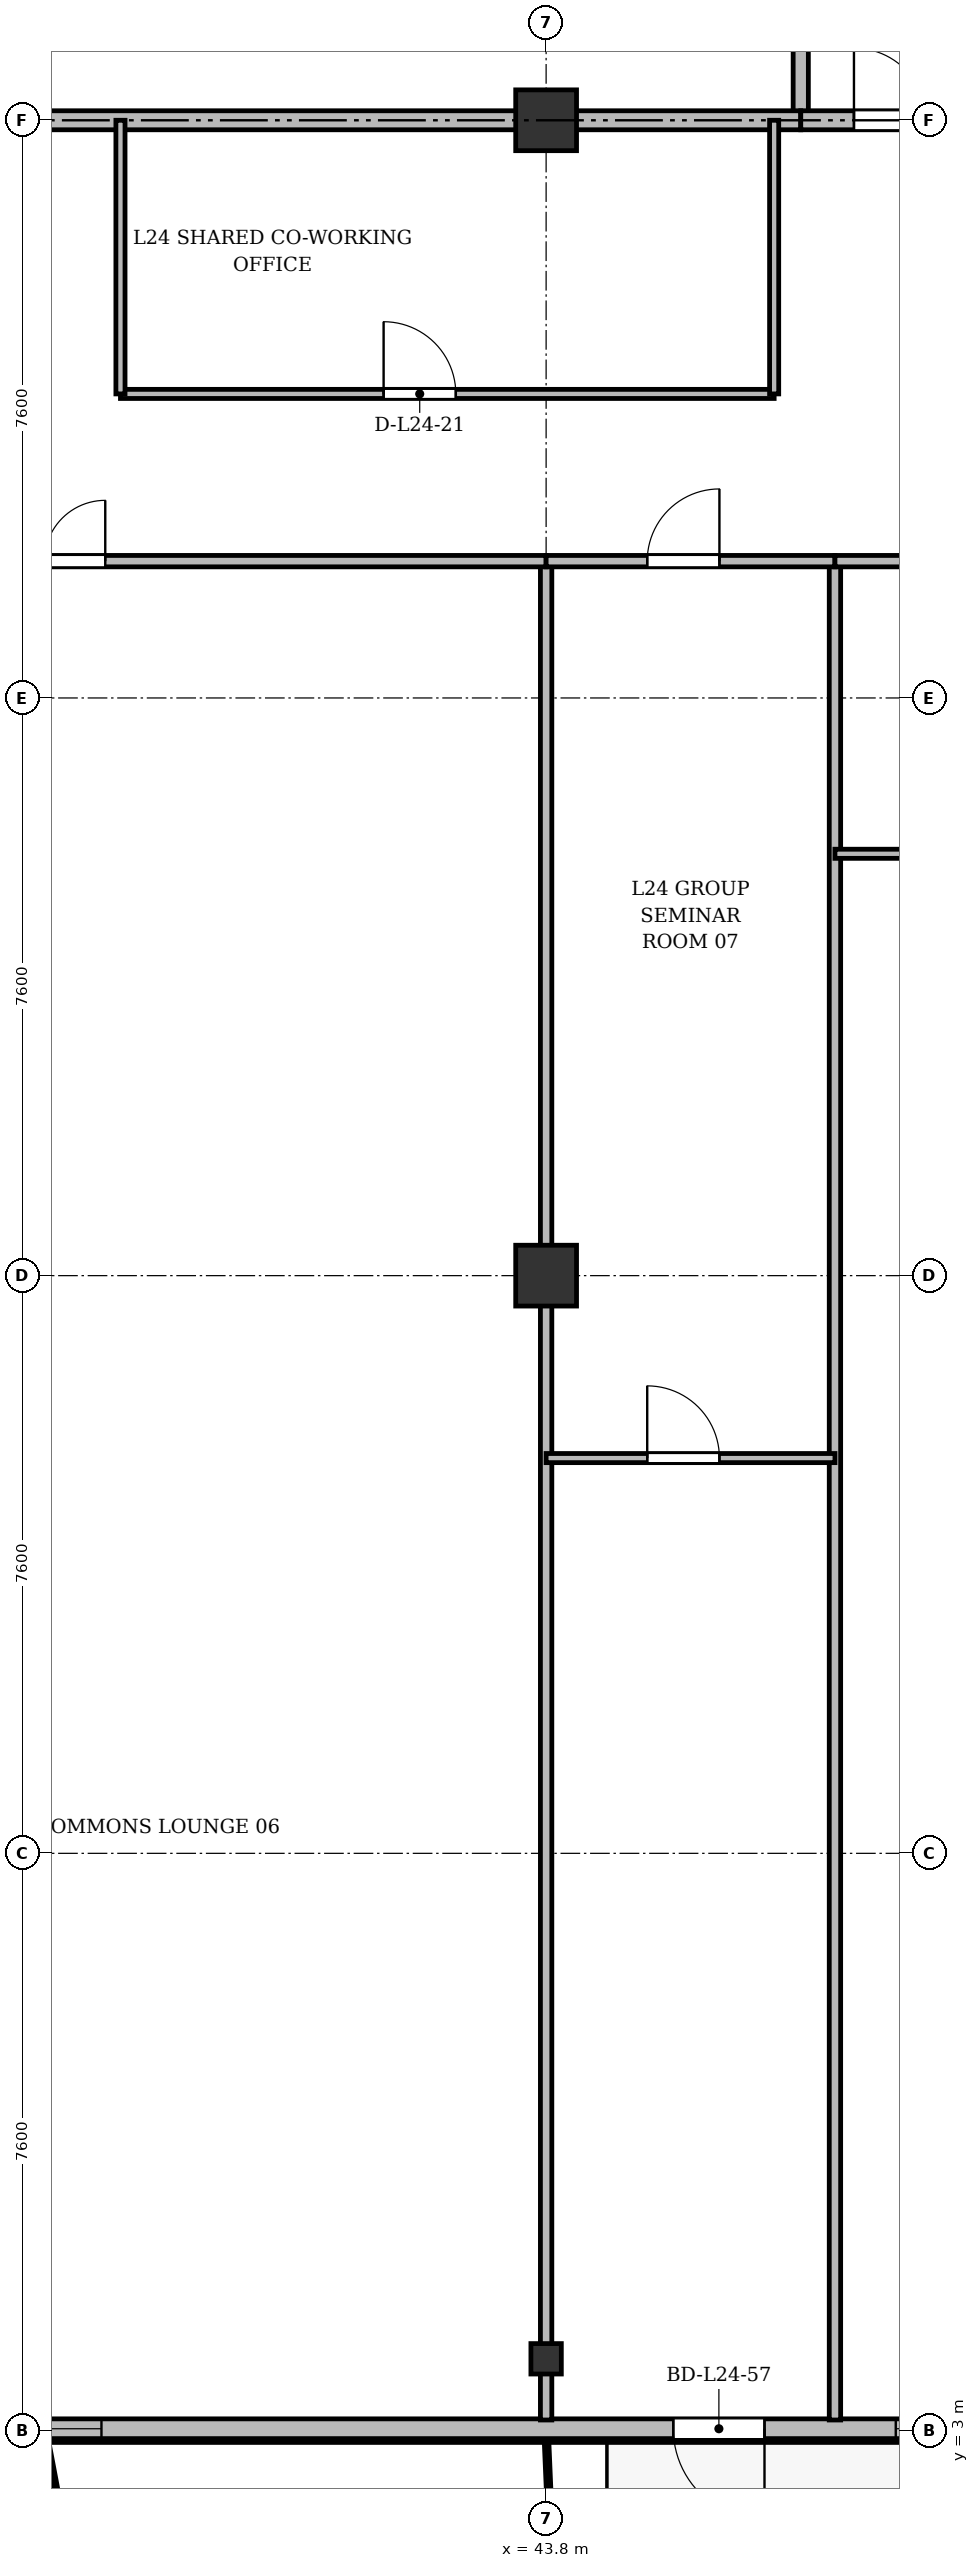
"""IFC4 building model, lengths in metres.
Left out: names, types, materials, properties, quantities, classifications, styles, units other than length and angle.
Written with IfcOpenShell. Run it as: python <this file> out.ifc"""

import sys

from ifc_helpers import new_model, si_unit, direction, frame, frame_2d, origin, origin_2d, place, context, subcontext, project, spatial, rectangle, i_section, extrude, source, transform, mapped, element, fill, save


model = new_model("IFC4")
c1 = context("Model", 3, precision=1e-05, world=origin(), true_north=direction((0.0, 1.0)))
c2 = subcontext(c1, "Body", "Model", "MODEL_VIEW")
j1 = project(units=[si_unit("LENGTHUNIT", "METRE"), si_unit("PLANEANGLEUNIT", "RADIAN")], contexts=[c1])
p1 = place(None, origin())
s1 = spatial("IfcSite", under=j1, at=p1, CompositionType="ELEMENT")
p2 = place(p1, origin())
s2 = spatial("IfcBuilding", under=s1, at=p2, CompositionType="ELEMENT")
p3 = place(p2, frame((0.0, 0.0, 96.1)))
s3 = spatial("IfcBuildingStorey", under=s2, at=p3, CompositionType="ELEMENT", Elevation=96.1)
m1 = source(origin(), c2, "Body", "SweptSolid", [
    extrude(i_section(OverallWidth=0.4, OverallDepth=0.4, WebThickness=0.022, FlangeThickness=0.035, at=origin_2d()), origin(), (0.0, 0.0, 1.0), 3.6),
])
p4 = place(p3, frame((43.8, 3.95, 0.0), z_axis=(0.0, 0.0, 1.0), x_axis=(1.0, 0.0, 0.0)))
e1 = element("IfcColumn", 1, at=p4, inside=s3, PredefinedType="COLUMN", context=c2, shape_type="MappedRepresentation", body=[
    mapped(m1, transform((0.0, 0.0, 0.0), x_axis=(1.0, 0.0, 0.0), y_axis=(0.0, 1.0, 0.0), z_axis=(0.0, 0.0, 1.0), scale=1.0)),
])
m2 = source(origin(), c2, "Body", "SweptSolid", [
    extrude(rectangle(XDim=0.8, YDim=0.8, at=origin_2d()), origin(), (0.0, 0.0, 1.0), 3.6),
])
for number, where, z_axis, x_axis in (
    (2, (43.8, 18.2, 0.0), (0.0, 0.0, 1.0), (1.0, 0.0, 0.0)),
    (3, (43.8, 33.4, 0.0), (0.0, 0.0, 1.0), (1.0, 0.0, 0.0)),
):
    element("IfcColumn", number, at=place(p3, frame(where, z_axis=z_axis, x_axis=x_axis)), inside=s3, PredefinedType="COLUMN", context=c2, shape_type="MappedRepresentation", body=[
        mapped(m2, transform((0.0, 0.0, 0.0), x_axis=(1.0, 0.0, 0.0), y_axis=(0.0, 1.0, 0.0), z_axis=(0.0, 0.0, 1.0), scale=1.0)),
    ])
p5 = place(p3, frame((66.9, 3.03, 0.0), z_axis=(0.0, 0.0, 1.0), x_axis=(-1.0, 0.0, 0.0)))
e4 = element("IfcWall", 4, at=p5, inside=s3, PredefinedType="SOLIDWALL", context=c2, shape_type="SweptSolid", body=[
    extrude(rectangle(XDim=59.4, YDim=0.26, at=frame_2d((29.7, 0.0))), origin(), (0.0, 0.0, 1.0), 3.34),
])
p6 = place(p5, frame((2.1, 0.0, 0.9)))
e5 = element("IfcOpeningElement", 5, at=p6, cuts=e4, PredefinedType="OPENING", context=c2, shape_type="SweptSolid", body=[
    extrude(rectangle(XDim=1.8, YDim=1.8, at=frame_2d((0.9, 0.9))), frame((0.0, 0.14, 0.0), z_axis=(0.0, -1.0, 0.0), x_axis=(1.0, 0.0, 0.0)), (0.0, 0.0, 1.0), 0.28),
])
p7 = place(p5, frame((5.3, 0.0, 0.9)))
e6 = element("IfcOpeningElement", 6, at=p7, cuts=e4, PredefinedType="OPENING", context=c2, shape_type="SweptSolid", body=[
    extrude(rectangle(XDim=2.2, YDim=1.8, at=frame_2d((1.1, 0.9))), frame((0.0, 0.14, 0.0), z_axis=(0.0, -1.0, 0.0), x_axis=(1.0, 0.0, 0.0)), (0.0, 0.0, 1.0), 0.28),
])
p8 = place(p5, frame((8.65, 0.0, 0.9)))
e7 = element("IfcOpeningElement", 7, at=p8, cuts=e4, PredefinedType="OPENING", context=c2, shape_type="SweptSolid", body=[
    extrude(rectangle(XDim=1.5, YDim=1.75, at=frame_2d((0.75, 0.875))), frame((0.0, 0.14, 0.0), z_axis=(0.0, -1.0, 0.0), x_axis=(1.0, 0.0, 0.0)), (0.0, 0.0, 1.0), 0.28),
])
p9 = place(p5, frame((11.0, 0.0, 0.9)))
e8 = element("IfcOpeningElement", 8, at=p9, cuts=e4, PredefinedType="OPENING", context=c2, shape_type="SweptSolid", body=[
    extrude(rectangle(XDim=2.0, YDim=1.95, at=frame_2d((1.0, 0.975))), frame((0.0, 0.14, 0.0), z_axis=(0.0, -1.0, 0.0), x_axis=(1.0, 0.0, 0.0)), (0.0, 0.0, 1.0), 0.28),
])
p10 = place(p5, frame((13.775, 0.0, 0.9)))
e9 = element("IfcOpeningElement", 9, at=p10, cuts=e4, PredefinedType="OPENING", context=c2, shape_type="SweptSolid", body=[
    extrude(rectangle(XDim=1.65, YDim=1.85, at=frame_2d((0.825, 0.925))), frame((0.0, 0.14, 0.0), z_axis=(0.0, -1.0, 0.0), x_axis=(1.0, 0.0, 0.0)), (0.0, 0.0, 1.0), 0.28),
])
p11 = place(p5, frame((16.7, 0.0, 0.9)))
e10 = element("IfcOpeningElement", 10, at=p11, cuts=e4, PredefinedType="OPENING", context=c2, shape_type="SweptSolid", body=[
    extrude(rectangle(XDim=1.8, YDim=1.8, at=frame_2d((0.9, 0.9))), frame((0.0, 0.14, 0.0), z_axis=(0.0, -1.0, 0.0), x_axis=(1.0, 0.0, 0.0)), (0.0, 0.0, 1.0), 0.28),
])
p12 = place(p5, frame((20.227, 0.0, 0.0)))
e11 = element("IfcOpeningElement", 11, at=p12, cuts=e4, PredefinedType="OPENING", context=c2, shape_type="SweptSolid", body=[
    extrude(rectangle(XDim=1.2, YDim=2.2, at=frame_2d((0.6, 1.1))), frame((0.0, 0.14, 0.0), z_axis=(0.0, -1.0, 0.0), x_axis=(1.0, 0.0, 0.0)), (0.0, 0.0, 1.0), 0.28),
])
p13 = place(p5, frame((28.95, 0.0, 0.9)))
e12 = element("IfcOpeningElement", 12, at=p13, cuts=e4, PredefinedType="OPENING", context=c2, shape_type="SweptSolid", body=[
    extrude(rectangle(XDim=1.5, YDim=1.75, at=frame_2d((0.75, 0.875))), frame((0.0, 0.14, 0.0), z_axis=(0.0, -1.0, 0.0), x_axis=(1.0, 0.0, 0.0)), (0.0, 0.0, 1.0), 0.28),
])
p14 = place(p5, frame((36.5, 0.0, 0.9)))
e13 = element("IfcOpeningElement", 13, at=p14, cuts=e4, PredefinedType="OPENING", context=c2, shape_type="SweptSolid", body=[
    extrude(rectangle(XDim=2.0, YDim=1.95, at=frame_2d((1.0, 0.975))), frame((0.0, 0.14, 0.0), z_axis=(0.0, -1.0, 0.0), x_axis=(1.0, 0.0, 0.0)), (0.0, 0.0, 1.0), 0.28),
])
p15 = place(p5, frame((39.075, 0.0, 0.9)))
e14 = element("IfcOpeningElement", 14, at=p15, cuts=e4, PredefinedType="OPENING", context=c2, shape_type="SweptSolid", body=[
    extrude(rectangle(XDim=1.65, YDim=1.85, at=frame_2d((0.825, 0.925))), frame((0.0, 0.14, 0.0), z_axis=(0.0, -1.0, 0.0), x_axis=(1.0, 0.0, 0.0)), (0.0, 0.0, 1.0), 0.28),
])
p16 = place(p5, frame((41.4, 0.0, 0.9)))
e15 = element("IfcOpeningElement", 15, at=p16, cuts=e4, PredefinedType="OPENING", context=c2, shape_type="SweptSolid", body=[
    extrude(rectangle(XDim=1.8, YDim=1.8, at=frame_2d((0.9, 0.9))), frame((0.0, 0.14, 0.0), z_axis=(0.0, -1.0, 0.0), x_axis=(1.0, 0.0, 0.0)), (0.0, 0.0, 1.0), 0.28),
])
p17 = place(p5, frame((45.36, 0.0, 0.0)))
e16 = element("IfcOpeningElement", 16, at=p17, cuts=e4, PredefinedType="OPENING", context=c2, shape_type="SweptSolid", body=[
    extrude(rectangle(XDim=1.2, YDim=2.2, at=frame_2d((0.6, 1.1))), frame((0.0, 0.14, 0.0), z_axis=(0.0, -1.0, 0.0), x_axis=(1.0, 0.0, 0.0)), (0.0, 0.0, 1.0), 0.28),
])
p18 = place(p5, frame((48.55, 0.0, 0.9)))
e17 = element("IfcOpeningElement", 17, at=p18, cuts=e4, PredefinedType="OPENING", context=c2, shape_type="SweptSolid", body=[
    extrude(rectangle(XDim=1.5, YDim=1.75, at=frame_2d((0.75, 0.875))), frame((0.0, 0.14, 0.0), z_axis=(0.0, -1.0, 0.0), x_axis=(1.0, 0.0, 0.0)), (0.0, 0.0, 1.0), 0.28),
])
p19 = place(p5, frame((52.0, 0.0, 0.9)))
e18 = element("IfcOpeningElement", 18, at=p19, cuts=e4, PredefinedType="OPENING", context=c2, shape_type="SweptSolid", body=[
    extrude(rectangle(XDim=2.0, YDim=1.95, at=frame_2d((1.0, 0.975))), frame((0.0, 0.14, 0.0), z_axis=(0.0, -1.0, 0.0), x_axis=(1.0, 0.0, 0.0)), (0.0, 0.0, 1.0), 0.28),
])
p20 = place(p5, frame((55.575, 0.0, 0.9)))
e19 = element("IfcOpeningElement", 19, at=p20, cuts=e4, PredefinedType="OPENING", context=c2, shape_type="SweptSolid", body=[
    extrude(rectangle(XDim=1.65, YDim=1.85, at=frame_2d((0.825, 0.925))), frame((0.0, 0.14, 0.0), z_axis=(0.0, -1.0, 0.0), x_axis=(1.0, 0.0, 0.0)), (0.0, 0.0, 1.0), 0.28),
])
p21 = place(p3, frame((47.15, 33.4, 0.0), z_axis=(0.0, 0.0, 1.0), x_axis=(0.0, 1.0, 0.0)))
e20 = element("IfcWall", 20, at=p21, inside=s3, PredefinedType="SOLIDWALL", context=c2, shape_type="SweptSolid", body=[
    extrude(rectangle(XDim=11.3, YDim=0.2, at=frame_2d((5.65, 0.0))), origin(), (0.0, 0.0, 1.0), 2.752),
])
p22 = place(p3, frame((26.3, 33.4, 0.0), z_axis=(0.0, 0.0, 1.0), x_axis=(1.0, 0.0, 0.0)))
e21 = element("IfcWall", 21, at=p22, inside=s3, PredefinedType="PARTITIONING", context=c2, shape_type="SweptSolid", body=[
    extrude(rectangle(XDim=20.85, YDim=0.25, at=frame_2d((10.425, 0.0))), origin(), (0.0, 0.0, 1.0), 2.752),
])
p23 = place(p22, frame((9.2, 0.0, 0.0)))
e22 = element("IfcOpeningElement", 22, at=p23, cuts=e21, PredefinedType="OPENING", context=c2, shape_type="SweptSolid", body=[
    extrude(rectangle(XDim=1.6, YDim=2.2, at=frame_2d((0.8, 1.1))), frame((0.0, 0.135, 0.0), z_axis=(0.0, -1.0, 0.0), x_axis=(1.0, 0.0, 0.0)), (0.0, 0.0, 1.0), 0.27),
])
p24 = place(p3, frame((47.15, 33.4, 0.0), z_axis=(0.0, 0.0, 1.0), x_axis=(1.0, 0.0, 0.0)))
e23 = element("IfcWall", 23, at=p24, inside=s3, PredefinedType="PARTITIONING", context=c2, shape_type="SweptSolid", body=[
    extrude(rectangle(XDim=11.15, YDim=0.25, at=frame_2d((5.575, 0.0))), origin(), (0.0, 0.0, 1.0), 2.752),
])
p25 = place(p24, frame((0.7, 0.0, 0.0)))
e24 = element("IfcOpeningElement", 24, at=p25, cuts=e23, PredefinedType="OPENING", context=c2, shape_type="SweptSolid", body=[
    extrude(rectangle(XDim=0.95, YDim=2.15, at=frame_2d((0.475, 1.075))), frame((0.0, 0.135, 0.0), z_axis=(0.0, -1.0, 0.0), x_axis=(1.0, 0.0, 0.0)), (0.0, 0.0, 1.0), 0.27),
])
p26 = place(p24, frame((6.0, 0.0, 0.0)))
e25 = element("IfcOpeningElement", 25, at=p26, cuts=e23, PredefinedType="OPENING", context=c2, shape_type="SweptSolid", body=[
    extrude(rectangle(XDim=1.2, YDim=2.15, at=frame_2d((0.6, 1.075))), frame((0.0, 0.135, 0.0), z_axis=(0.0, -1.0, 0.0), x_axis=(1.0, 0.0, 0.0)), (0.0, 0.0, 1.0), 0.27),
])
p27 = place(p3, frame((38.2, 29.8, 0.0), z_axis=(0.0, 0.0, 1.0), x_axis=(1.0, 0.0, 0.0)))
e26 = element("IfcWall", 26, at=p27, inside=s3, PredefinedType="PARTITIONING", context=c2, shape_type="SweptSolid", body=[
    extrude(rectangle(XDim=8.6, YDim=0.12, at=frame_2d((4.3, 0.0))), origin(), (0.0, 0.0, 1.0), 2.84),
])
p28 = place(p27, frame((3.462, 0.0, 0.0)))
e27 = element("IfcOpeningElement", 27, at=p28, cuts=e26, PredefinedType="OPENING", context=c2, shape_type="SweptSolid", body=[
    extrude(rectangle(XDim=0.95, YDim=2.15, at=frame_2d((0.475, 1.075))), frame((0.0, 0.07, 0.0), z_axis=(0.0, -1.0, 0.0), x_axis=(1.0, 0.0, 0.0)), (0.0, 0.0, 1.0), 0.14),
])
for number, where, z_axis, x_axis in (
    (28, (38.2, 29.8, 0.0), (0.0, 0.0, 1.0), (0.0, 1.0, 0.0)),
    (29, (46.8, 29.8, 0.0), (0.0, 0.0, 1.0), (0.0, 1.0, 0.0)),
):
    element("IfcWall", number, at=place(p3, frame(where, z_axis=z_axis, x_axis=x_axis)), inside=s3, PredefinedType="PARTITIONING", context=c2, shape_type="SweptSolid", body=[
        extrude(rectangle(XDim=3.6, YDim=0.12, at=frame_2d((1.8, 0.0))), origin(), (0.0, 0.0, 1.0), 2.752),
    ])
p29 = place(p3, frame((43.8, 3.145, 0.0), z_axis=(0.0, 0.0, 1.0), x_axis=(0.0, 1.0, 0.0)))
e30 = element("IfcWall", 30, at=p29, inside=s3, PredefinedType="PARTITIONING", context=c2, shape_type="SweptSolid", body=[
    extrude(rectangle(XDim=24.455, YDim=0.15, at=frame_2d((12.228, 0.0))), origin(), (0.0, 0.0, 1.0), 2.84),
])
p30 = place(p3, frame((47.6, 3.145, 0.0), z_axis=(0.0, 0.0, 1.0), x_axis=(0.0, 1.0, 0.0)))
e31 = element("IfcWall", 31, at=p30, inside=s3, PredefinedType="PARTITIONING", context=c2, shape_type="SweptSolid", body=[
    extrude(rectangle(XDim=24.455, YDim=0.15, at=frame_2d((12.228, 0.0))), origin(), (0.0, 0.0, 1.0), 2.752),
])
p31 = place(p3, frame((30.6, 27.6, 0.0), z_axis=(0.0, 0.0, 1.0), x_axis=(1.0, 0.0, 0.0)))
e32 = element("IfcWall", 32, at=p31, inside=s3, PredefinedType="PARTITIONING", context=c2, shape_type="SweptSolid", body=[
    extrude(rectangle(XDim=13.2, YDim=0.15, at=frame_2d((6.6, 0.0))), origin(), (0.0, 0.0, 1.0), 2.84),
])
p32 = place(p31, frame((5.8, 0.0, 0.0)))
e33 = element("IfcOpeningElement", 33, at=p32, cuts=e32, PredefinedType="OPENING", context=c2, shape_type="SweptSolid", body=[
    extrude(rectangle(XDim=1.6, YDim=2.2, at=frame_2d((0.8, 1.1))), frame((0.0, 0.085, 0.0), z_axis=(0.0, -1.0, 0.0), x_axis=(1.0, 0.0, 0.0)), (0.0, 0.0, 1.0), 0.17),
])
p33 = place(p3, frame((43.8, 27.6, 0.0), z_axis=(0.0, 0.0, 1.0), x_axis=(1.0, 0.0, 0.0)))
e34 = element("IfcWall", 34, at=p33, inside=s3, PredefinedType="PARTITIONING", context=c2, shape_type="SweptSolid", body=[
    extrude(rectangle(XDim=3.8, YDim=0.15, at=frame_2d((1.9, 0.0))), origin(), (0.0, 0.0, 1.0), 2.84),
])
p34 = place(p33, frame((1.33, 0.0, 0.0)))
e35 = element("IfcOpeningElement", 35, at=p34, cuts=e34, PredefinedType="OPENING", context=c2, shape_type="SweptSolid", body=[
    extrude(rectangle(XDim=0.95, YDim=2.15, at=frame_2d((0.475, 1.075))), frame((0.0, 0.085, 0.0), z_axis=(0.0, -1.0, 0.0), x_axis=(1.0, 0.0, 0.0)), (0.0, 0.0, 1.0), 0.17),
])
p35 = place(p3, frame((43.8, 15.8, 0.0), z_axis=(0.0, 0.0, 1.0), x_axis=(1.0, 0.0, 0.0)))
e36 = element("IfcWall", 36, at=p35, inside=s3, PredefinedType="PARTITIONING", context=c2, shape_type="SweptSolid", body=[
    extrude(rectangle(XDim=3.8, YDim=0.12, at=frame_2d((1.9, 0.0))), origin(), (0.0, 0.0, 1.0), 2.84),
])
p36 = place(p35, frame((1.33, 0.0, 0.0)))
e37 = element("IfcOpeningElement", 37, at=p36, cuts=e36, PredefinedType="OPENING", context=c2, shape_type="SweptSolid", body=[
    extrude(rectangle(XDim=0.95, YDim=2.15, at=frame_2d((0.475, 1.075))), frame((0.0, 0.07, 0.0), z_axis=(0.0, -1.0, 0.0), x_axis=(1.0, 0.0, 0.0)), (0.0, 0.0, 1.0), 0.14),
])
p37 = place(p3, frame((47.6, 27.6, 0.0), z_axis=(0.0, 0.0, 1.0), x_axis=(1.0, 0.0, 0.0)))
e38 = element("IfcWall", 38, at=p37, inside=s3, PredefinedType="PARTITIONING", context=c2, shape_type="SweptSolid", body=[
    extrude(rectangle(XDim=3.4, YDim=0.15, at=frame_2d((1.7, 0.0))), origin(), (0.0, 0.0, 1.0), 2.84),
])
p38 = place(p37, frame((1.131, 0.0, 0.0)))
e39 = element("IfcOpeningElement", 39, at=p38, cuts=e38, PredefinedType="OPENING", context=c2, shape_type="SweptSolid", body=[
    extrude(rectangle(XDim=0.95, YDim=2.15, at=frame_2d((0.475, 1.075))), frame((0.0, 0.085, 0.0), z_axis=(0.0, -1.0, 0.0), x_axis=(1.0, 0.0, 0.0)), (0.0, 0.0, 1.0), 0.17),
])
p39 = place(p3, frame((47.6, 23.75, 0.0), z_axis=(0.0, 0.0, 1.0), x_axis=(1.0, 0.0, 0.0)))
e40 = element("IfcWall", 40, at=p39, inside=s3, PredefinedType="PARTITIONING", context=c2, shape_type="SweptSolid", body=[
    extrude(rectangle(XDim=3.4, YDim=0.12, at=frame_2d((1.7, 0.0))), origin(), (0.0, 0.0, 1.0), 2.84),
])
p40 = place(p39, frame((1.131, 0.0, 0.0)))
e41 = element("IfcOpeningElement", 41, at=p40, cuts=e40, PredefinedType="OPENING", context=c2, shape_type="SweptSolid", body=[
    extrude(rectangle(XDim=0.95, YDim=2.15, at=frame_2d((0.475, 1.075))), frame((0.0, 0.07, 0.0), z_axis=(0.0, -1.0, 0.0), x_axis=(1.0, 0.0, 0.0)), (0.0, 0.0, 1.0), 0.14),
])
m3 = source(origin(), c2, "Body", "SweptSolid", [
    extrude(rectangle(XDim=1.8, YDim=1.8, at=frame_2d((0.9, 0.9))), frame((0.0, 0.03, 0.0), z_axis=(0.0, -1.0, 0.0), x_axis=(1.0, 0.0, 0.0)), (0.0, 0.0, 1.0), 0.06),
])
p41 = place(p11, origin())
e42 = element("IfcWindow", 42, at=p41, inside=s3, PartitioningType="SINGLE_PANEL", PredefinedType="WINDOW", context=c2, shape_type="MappedRepresentation", body=[
    mapped(m3, transform((0.0, 0.0, 0.0), x_axis=(1.0, 0.0, 0.0), y_axis=(0.0, 1.0, 0.0), z_axis=(0.0, 0.0, 1.0), scale=1.0)),
])
fill(e10, e42)
m4 = source(origin(), c2, "Body", "SweptSolid", [
    extrude(rectangle(XDim=1.2, YDim=2.2, at=frame_2d((0.6, 1.1))), frame((0.0, 0.025, 0.0), z_axis=(0.0, -1.0, 0.0), x_axis=(1.0, 0.0, 0.0)), (0.0, 0.0, 1.0), 0.05),
])
p42 = place(p12, origin())
e43 = element("IfcDoor", 43, at=p42, inside=s3, OperationType="SINGLE_SWING_LEFT", PredefinedType="DOOR", context=c2, shape_type="MappedRepresentation", body=[
    mapped(m4, transform((0.0, 0.0, 0.0), x_axis=(1.0, 0.0, 0.0), y_axis=(0.0, 1.0, 0.0), z_axis=(0.0, 0.0, 1.0), scale=1.0)),
])
fill(e11, e43)
m5 = source(origin(), c2, "Body", "SweptSolid", [
    extrude(rectangle(XDim=1.5, YDim=1.75, at=frame_2d((0.75, 0.875))), frame((0.0, 0.03, 0.0), z_axis=(0.0, -1.0, 0.0), x_axis=(1.0, 0.0, 0.0)), (0.0, 0.0, 1.0), 0.06),
])
p43 = place(p13, origin())
e44 = element("IfcWindow", 44, at=p43, inside=s3, PartitioningType="SINGLE_PANEL", PredefinedType="WINDOW", context=c2, shape_type="MappedRepresentation", body=[
    mapped(m5, transform((0.0, 0.0, 0.0), x_axis=(1.0, 0.0, 0.0), y_axis=(0.0, 1.0, 0.0), z_axis=(0.0, 0.0, 1.0), scale=1.0)),
])
fill(e12, e44)
m6 = source(origin(), c2, "Body", "SweptSolid", [
    extrude(rectangle(XDim=0.95, YDim=2.15, at=frame_2d((0.475, 1.075))), frame((0.0, 0.025, 0.0), z_axis=(0.0, -1.0, 0.0), x_axis=(1.0, 0.0, 0.0)), (0.0, 0.0, 1.0), 0.05),
])
p44 = place(p25, origin())
e45 = element("IfcDoor", 45, at=p44, inside=s3, OperationType="SINGLE_SWING_LEFT", PredefinedType="DOOR", context=c2, shape_type="MappedRepresentation", body=[
    mapped(m6, transform((0.0, 0.0, 0.0), x_axis=(1.0, 0.0, 0.0), y_axis=(0.0, 1.0, 0.0), z_axis=(0.0, 0.0, 1.0), scale=1.0)),
])
fill(e24, e45)
p45 = place(p28, origin())
e46 = element("IfcDoor", 46, at=p45, inside=s3, OperationType="SINGLE_SWING_LEFT", PredefinedType="DOOR", context=c2, shape_type="MappedRepresentation", body=[
    mapped(m6, transform((0.0, 0.0, 0.0), x_axis=(1.0, 0.0, 0.0), y_axis=(0.0, 1.0, 0.0), z_axis=(0.0, 0.0, 1.0), scale=1.0)),
])
fill(e27, e46)
m7 = source(origin(), c2, "Body", "SweptSolid", [
    extrude(rectangle(XDim=1.6, YDim=2.2, at=frame_2d((0.8, 1.1))), frame((0.0, 0.025, 0.0), z_axis=(0.0, -1.0, 0.0), x_axis=(1.0, 0.0, 0.0)), (0.0, 0.0, 1.0), 0.05),
])
p46 = place(p32, origin())
e47 = element("IfcDoor", 47, at=p46, inside=s3, OperationType="DOUBLE_DOOR_SINGLE_SWING", PredefinedType="DOOR", context=c2, shape_type="MappedRepresentation", body=[
    mapped(m7, transform((0.0, 0.0, 0.0), x_axis=(1.0, 0.0, 0.0), y_axis=(0.0, 1.0, 0.0), z_axis=(0.0, 0.0, 1.0), scale=1.0)),
])
fill(e33, e47)
p47 = place(p34, origin())
e48 = element("IfcDoor", 48, at=p47, inside=s3, OperationType="SINGLE_SWING_RIGHT", PredefinedType="DOOR", context=c2, shape_type="MappedRepresentation", body=[
    mapped(m6, transform((0.0, 0.0, 0.0), x_axis=(1.0, 0.0, 0.0), y_axis=(0.0, 1.0, 0.0), z_axis=(0.0, 0.0, 1.0), scale=1.0)),
])
fill(e35, e48)
p48 = place(p36, origin())
e49 = element("IfcDoor", 49, at=p48, inside=s3, OperationType="SINGLE_SWING_LEFT", PredefinedType="DOOR", context=c2, shape_type="MappedRepresentation", body=[
    mapped(m6, transform((0.0, 0.0, 0.0), x_axis=(1.0, 0.0, 0.0), y_axis=(0.0, 1.0, 0.0), z_axis=(0.0, 0.0, 1.0), scale=1.0)),
])
fill(e37, e49)
save(model, sys.argv[1])
